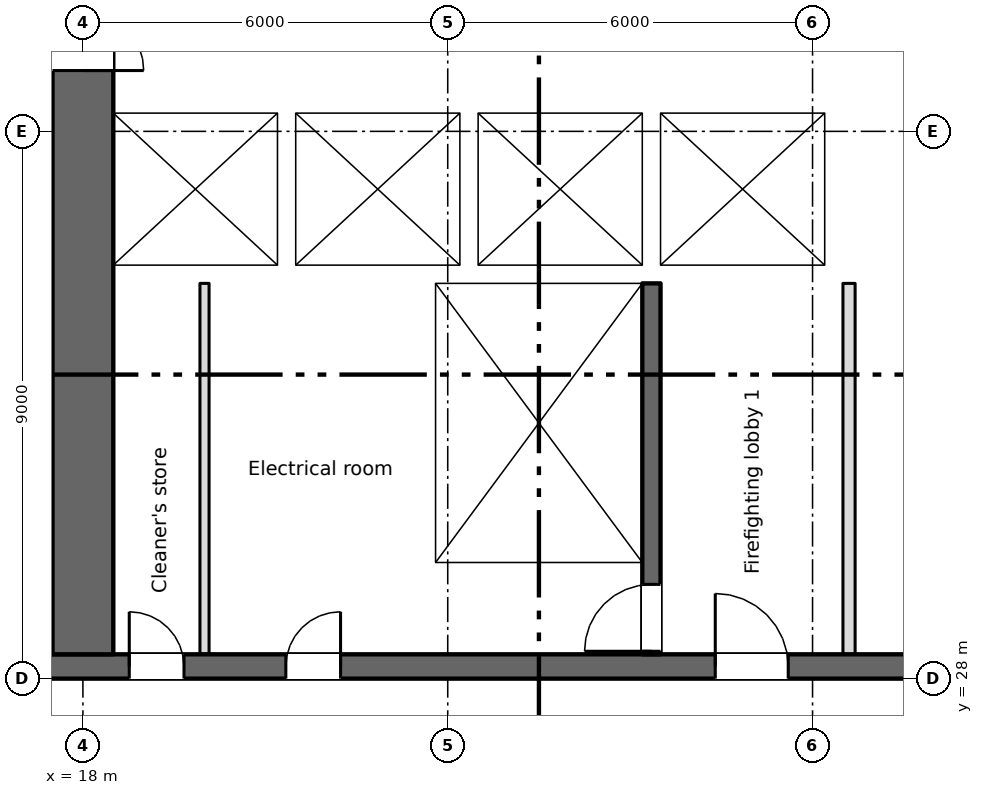
"""IFC4 building model, lengths in metres.
Left out: names, types, materials, properties, quantities, classifications, styles, units other than length and angle.
Written with IfcOpenShell. Run it as: python <this file> out.ifc"""

import sys

from ifc_helpers import new_model, si_unit, direction, frame, frame_2d, origin, place, context, subcontext, project, spatial, rectangle, extrude, element, fill, save


model = new_model("IFC4")
c1 = context("Model", 3, precision=1e-05, world=origin(), true_north=direction((0.0, 1.0)))
c2 = subcontext(c1, "Body", "Model", "MODEL_VIEW")
j1 = project(units=[si_unit("LENGTHUNIT", "METRE"), si_unit("PLANEANGLEUNIT", "RADIAN")], contexts=[c1])
p1 = place(None, origin())
s1 = spatial("IfcSite", under=j1, at=p1, CompositionType="ELEMENT")
p2 = place(p1, origin())
s2 = spatial("IfcBuilding", under=s1, at=p2, CompositionType="ELEMENT")
p3 = place(p2, frame((0.0, 0.0, 75.0)))
s3 = spatial("IfcBuildingStorey", under=s2, at=p3, CompositionType="ELEMENT", Elevation=75.0)
p4 = place(p3, frame((6.7, 28.2, 0.0), z_axis=(0.0, 0.0, 1.0), x_axis=(1.0, 0.0, 0.0)))
e1 = element("IfcWall", 1, at=p4, inside=s3, PredefinedType="SHEAR", context=c2, shape_type="SweptSolid", body=[
    extrude(rectangle(XDim=57.8, YDim=0.4, at=frame_2d((28.9, 0.0))), origin(), (0.0, 0.0, 1.0), 3.35),
])
p5 = place(p4, frame((12.062, 0.0, 0.0)))
e2 = element("IfcOpeningElement", 2, at=p5, cuts=e1, PredefinedType="OPENING", context=c2, shape_type="SweptSolid", body=[
    extrude(rectangle(XDim=0.9, YDim=2.1, at=frame_2d((0.45, 1.05))), frame((0.0, 0.21, 0.0), z_axis=(0.0, -1.0, 0.0), x_axis=(1.0, 0.0, 0.0)), (0.0, 0.0, 1.0), 0.42),
])
p6 = place(p4, frame((14.637, 0.0, 0.0)))
e3 = element("IfcOpeningElement", 3, at=p6, cuts=e1, PredefinedType="OPENING", context=c2, shape_type="SweptSolid", body=[
    extrude(rectangle(XDim=0.9, YDim=2.1, at=frame_2d((0.45, 1.05))), frame((0.0, 0.21, 0.0), z_axis=(0.0, -1.0, 0.0), x_axis=(1.0, 0.0, 0.0)), (0.0, 0.0, 1.0), 0.42),
])
p7 = place(p4, frame((49.062, 0.0, 0.0)))
e4 = element("IfcOpeningElement", 4, at=p7, cuts=e1, PredefinedType="OPENING", context=c2, shape_type="SweptSolid", body=[
    extrude(rectangle(XDim=0.9, YDim=2.1, at=frame_2d((0.45, 1.05))), frame((0.0, 0.21, 0.0), z_axis=(0.0, -1.0, 0.0), x_axis=(1.0, 0.0, 0.0)), (0.0, 0.0, 1.0), 0.42),
])
p8 = place(p4, frame((51.637, 0.0, 0.0)))
e5 = element("IfcOpeningElement", 5, at=p8, cuts=e1, PredefinedType="OPENING", context=c2, shape_type="SweptSolid", body=[
    extrude(rectangle(XDim=0.9, YDim=2.1, at=frame_2d((0.45, 1.05))), frame((0.0, 0.21, 0.0), z_axis=(0.0, -1.0, 0.0), x_axis=(1.0, 0.0, 0.0)), (0.0, 0.0, 1.0), 0.42),
])
p9 = place(p4, frame((1.35, 0.0, 0.0)))
e6 = element("IfcOpeningElement", 6, at=p9, cuts=e1, PredefinedType="OPENING", context=c2, shape_type="SweptSolid", body=[
    extrude(rectangle(XDim=0.9, YDim=2.1, at=frame_2d((0.45, 1.05))), frame((0.0, 0.21, 0.0), z_axis=(0.0, -1.0, 0.0), x_axis=(1.0, 0.0, 0.0)), (0.0, 0.0, 1.0), 0.42),
])
p10 = place(p4, frame((4.7, 0.0, 0.0)))
e7 = element("IfcOpeningElement", 7, at=p10, cuts=e1, PredefinedType="OPENING", context=c2, shape_type="SweptSolid", body=[
    extrude(rectangle(XDim=1.2, YDim=2.1, at=frame_2d((0.6, 1.05))), frame((0.0, 0.21, 0.0), z_axis=(0.0, -1.0, 0.0), x_axis=(1.0, 0.0, 0.0)), (0.0, 0.0, 1.0), 0.42),
])
p11 = place(p4, frame((31.7, 0.0, 0.0)))
e8 = element("IfcOpeningElement", 8, at=p11, cuts=e1, PredefinedType="OPENING", context=c2, shape_type="SweptSolid", body=[
    extrude(rectangle(XDim=1.2, YDim=2.1, at=frame_2d((0.6, 1.05))), frame((0.0, 0.21, 0.0), z_axis=(0.0, -1.0, 0.0), x_axis=(1.0, 0.0, 0.0)), (0.0, 0.0, 1.0), 0.42),
])
p12 = place(p4, frame((55.2, 0.0, 0.0)))
e9 = element("IfcOpeningElement", 9, at=p12, cuts=e1, PredefinedType="OPENING", context=c2, shape_type="SweptSolid", body=[
    extrude(rectangle(XDim=1.2, YDim=2.1, at=frame_2d((0.6, 1.05))), frame((0.0, 0.21, 0.0), z_axis=(0.0, -1.0, 0.0), x_axis=(1.0, 0.0, 0.0)), (0.0, 0.0, 1.0), 0.42),
])
p13 = place(p4, frame((21.7, 0.0, 0.0)))
e10 = element("IfcOpeningElement", 10, at=p13, cuts=e1, PredefinedType="OPENING", context=c2, shape_type="SweptSolid", body=[
    extrude(rectangle(XDim=1.2, YDim=2.1, at=frame_2d((0.6, 1.05))), frame((0.0, 0.21, 0.0), z_axis=(0.0, -1.0, 0.0), x_axis=(1.0, 0.0, 0.0)), (0.0, 0.0, 1.0), 0.42),
])
p14 = place(p4, frame((41.7, 0.0, 0.0)))
e11 = element("IfcOpeningElement", 11, at=p14, cuts=e1, PredefinedType="OPENING", context=c2, shape_type="SweptSolid", body=[
    extrude(rectangle(XDim=1.2, YDim=2.1, at=frame_2d((0.6, 1.05))), frame((0.0, 0.21, 0.0), z_axis=(0.0, -1.0, 0.0), x_axis=(1.0, 0.0, 0.0)), (0.0, 0.0, 1.0), 0.42),
])
p15 = place(p4, frame((24.85, 0.0, 0.0)))
e12 = element("IfcOpeningElement", 12, at=p15, cuts=e1, PredefinedType="OPENING", context=c2, shape_type="SweptSolid", body=[
    extrude(rectangle(XDim=2.4, YDim=2.1, at=frame_2d((1.2, 1.05))), frame((0.0, 0.21, 0.0), z_axis=(0.0, -1.0, 0.0), x_axis=(1.0, 0.0, 0.0)), (0.0, 0.0, 1.0), 0.42),
])
p16 = place(p4, frame((37.35, 0.0, 0.0)))
e13 = element("IfcOpeningElement", 13, at=p16, cuts=e1, PredefinedType="OPENING", context=c2, shape_type="SweptSolid", body=[
    extrude(rectangle(XDim=2.4, YDim=2.1, at=frame_2d((1.2, 1.05))), frame((0.0, 0.21, 0.0), z_axis=(0.0, -1.0, 0.0), x_axis=(1.0, 0.0, 0.0)), (0.0, 0.0, 1.0), 0.42),
])
p17 = place(p4, frame((7.85, 0.0, 0.0)))
e14 = element("IfcOpeningElement", 14, at=p17, cuts=e1, PredefinedType="OPENING", context=c2, shape_type="SweptSolid", body=[
    extrude(rectangle(XDim=2.4, YDim=2.1, at=frame_2d((1.2, 1.05))), frame((0.0, 0.21, 0.0), z_axis=(0.0, -1.0, 0.0), x_axis=(1.0, 0.0, 0.0)), (0.0, 0.0, 1.0), 0.42),
])
p18 = place(p4, frame((28.85, 0.0, 0.0)))
e15 = element("IfcOpeningElement", 15, at=p18, cuts=e1, PredefinedType="OPENING", context=c2, shape_type="SweptSolid", body=[
    extrude(rectangle(XDim=0.9, YDim=2.1, at=frame_2d((0.45, 1.05))), frame((0.0, 0.21, 0.0), z_axis=(0.0, -1.0, 0.0), x_axis=(1.0, 0.0, 0.0)), (0.0, 0.0, 1.0), 0.42),
])
p19 = place(p4, frame((34.85, 0.0, 0.0)))
e16 = element("IfcOpeningElement", 16, at=p19, cuts=e1, PredefinedType="OPENING", context=c2, shape_type="SweptSolid", body=[
    extrude(rectangle(XDim=0.9, YDim=2.1, at=frame_2d((0.45, 1.05))), frame((0.0, 0.21, 0.0), z_axis=(0.0, -1.0, 0.0), x_axis=(1.0, 0.0, 0.0)), (0.0, 0.0, 1.0), 0.42),
])
p20 = place(p3, frame((18.0, 28.4, 0.0), z_axis=(0.0, 0.0, 1.0), x_axis=(0.0, 1.0, 0.0)))
e17 = element("IfcWall", 17, at=p20, inside=s3, PredefinedType="SHEAR", context=c2, shape_type="SweptSolid", body=[
    extrude(rectangle(XDim=16.6, YDim=1.0, at=frame_2d((8.3, 0.0))), origin(), (0.0, 0.0, 1.0), 3.35),
])
p21 = place(p20, frame((9.6, 0.0, 0.0)))
e18 = element("IfcOpeningElement", 18, at=p21, cuts=e17, PredefinedType="OPENING", context=c2, shape_type="SweptSolid", body=[
    extrude(rectangle(XDim=2.0, YDim=2.1, at=frame_2d((1.0, 1.05))), frame((0.0, 0.51, 0.0), z_axis=(0.0, -1.0, 0.0), x_axis=(1.0, 0.0, 0.0)), (0.0, 0.0, 1.0), 1.02),
])
p22 = place(p20, frame((15.25, 0.0, 0.0)))
e19 = element("IfcOpeningElement", 19, at=p22, cuts=e17, PredefinedType="OPENING", context=c2, shape_type="SweptSolid", body=[
    extrude(rectangle(XDim=1.2, YDim=2.1, at=frame_2d((0.6, 1.05))), frame((0.0, 0.51, 0.0), z_axis=(0.0, -1.0, 0.0), x_axis=(1.0, 0.0, 0.0)), (0.0, 0.0, 1.0), 1.02),
])
p23 = place(p3, frame((23.65, 28.4, 0.0), z_axis=(0.0, 0.0, 1.0), x_axis=(0.0, 1.0, 0.0)))
e20 = element("IfcWall", 20, at=p23, inside=s3, PredefinedType="SHEAR", context=c2, shape_type="SweptSolid", body=[
    extrude(rectangle(XDim=6.1, YDim=0.3, at=frame_2d((3.05, 0.0))), origin(), (0.0, 0.0, 1.0), 3.35),
])
p24 = place(p3, frame((27.35, 28.4, 0.0), z_axis=(0.0, 0.0, 1.0), x_axis=(0.0, 1.0, 0.0)))
e21 = element("IfcWall", 21, at=p24, inside=s3, PredefinedType="SHEAR", context=c2, shape_type="SweptSolid", body=[
    extrude(rectangle(XDim=6.1, YDim=0.3, at=frame_2d((3.05, 0.0))), origin(), (0.0, 0.0, 1.0), 3.35),
])
p25 = place(p24, frame((0.05, 0.0, 0.0)))
e22 = element("IfcOpeningElement", 22, at=p25, cuts=e21, PredefinedType="OPENING", context=c2, shape_type="SweptSolid", body=[
    extrude(rectangle(XDim=1.1, YDim=2.1, at=frame_2d((0.55, 1.05))), frame((0.0, 0.16, 0.0), z_axis=(0.0, -1.0, 0.0), x_axis=(1.0, 0.0, 0.0)), (0.0, 0.0, 1.0), 0.32),
])
p26 = place(p3, frame((18.5, 34.65, 0.0), z_axis=(0.0, 0.0, 1.0), x_axis=(1.0, 0.0, 0.0)))
e23 = element("IfcWall", 23, at=p26, inside=s3, PredefinedType="SHEAR", context=c2, shape_type="SweptSolid", body=[
    extrude(rectangle(XDim=12.2, YDim=0.3, at=frame_2d((6.1, 0.0))), origin(), (0.0, 0.0, 1.0), 3.35),
])
p27 = place(p26, frame((9.8, 0.0, 0.0)))
e24 = element("IfcOpeningElement", 24, at=p27, cuts=e23, PredefinedType="OPENING", context=c2, shape_type="SweptSolid", body=[
    extrude(rectangle(XDim=1.1, YDim=2.1, at=frame_2d((0.55, 1.05))), frame((0.0, 0.16, 0.0), z_axis=(0.0, -1.0, 0.0), x_axis=(1.0, 0.0, 0.0)), (0.0, 0.0, 1.0), 0.32),
])
p28 = place(p3, frame((18.5, 37.45, 0.0), z_axis=(0.0, 0.0, 1.0), x_axis=(1.0, 0.0, 0.0)))
e25 = element("IfcWall", 25, at=p28, inside=s3, PredefinedType="SHEAR", context=c2, shape_type="SweptSolid", body=[
    extrude(rectangle(XDim=12.2, YDim=0.3, at=frame_2d((6.1, 0.0))), origin(), (0.0, 0.0, 1.0), 3.35),
])
p29 = place(p28, frame((0.8, 0.0, 0.0)))
e26 = element("IfcOpeningElement", 26, at=p29, cuts=e25, PredefinedType="OPENING", context=c2, shape_type="SweptSolid", body=[
    extrude(rectangle(XDim=1.1, YDim=2.1, at=frame_2d((0.55, 1.05))), frame((0.0, 0.16, 0.0), z_axis=(0.0, -1.0, 0.0), x_axis=(1.0, 0.0, 0.0)), (0.0, 0.0, 1.0), 0.32),
])
p30 = place(p28, frame((3.8, 0.0, 0.0)))
e27 = element("IfcOpeningElement", 27, at=p30, cuts=e25, PredefinedType="OPENING", context=c2, shape_type="SweptSolid", body=[
    extrude(rectangle(XDim=1.1, YDim=2.1, at=frame_2d((0.55, 1.05))), frame((0.0, 0.16, 0.0), z_axis=(0.0, -1.0, 0.0), x_axis=(1.0, 0.0, 0.0)), (0.0, 0.0, 1.0), 0.32),
])
p31 = place(p28, frame((6.8, 0.0, 0.0)))
e28 = element("IfcOpeningElement", 28, at=p31, cuts=e25, PredefinedType="OPENING", context=c2, shape_type="SweptSolid", body=[
    extrude(rectangle(XDim=1.1, YDim=2.1, at=frame_2d((0.55, 1.05))), frame((0.0, 0.16, 0.0), z_axis=(0.0, -1.0, 0.0), x_axis=(1.0, 0.0, 0.0)), (0.0, 0.0, 1.0), 0.32),
])
p32 = place(p3, frame((27.35, 34.8, 0.0), z_axis=(0.0, 0.0, 1.0), x_axis=(0.0, 1.0, 0.0)))
e29 = element("IfcWall", 29, at=p32, inside=s3, PredefinedType="SHEAR", context=c2, shape_type="SweptSolid", body=[
    extrude(rectangle(XDim=2.5, YDim=0.3, at=frame_2d((1.25, 0.0))), origin(), (0.0, 0.0, 1.0), 3.35),
])
p33 = place(p3, frame((30.45, 34.8, 0.0), z_axis=(0.0, 0.0, 1.0), x_axis=(0.0, 1.0, 0.0)))
e30 = element("IfcWall", 30, at=p33, inside=s3, PredefinedType="SHEAR", context=c2, shape_type="SweptSolid", body=[
    extrude(rectangle(XDim=2.5, YDim=0.5, at=frame_2d((1.25, 0.0))), origin(), (0.0, 0.0, 1.0), 3.35),
])
for number, where, z_axis, x_axis in (
    (31, (21.35, 34.8, 0.0), (0.0, 0.0, 1.0), (0.0, 1.0, 0.0)),
    (32, (24.35, 34.8, 0.0), (0.0, 0.0, 1.0), (0.0, 1.0, 0.0)),
):
    element("IfcWall", number, at=place(p3, frame(where, z_axis=z_axis, x_axis=x_axis)), inside=s3, PredefinedType="SHEAR", context=c2, shape_type="SweptSolid", body=[
        extrude(rectangle(XDim=2.5, YDim=0.3, at=frame_2d((1.25, 0.0))), origin(), (0.0, 0.0, 1.0), 3.35),
    ])
p34 = place(p3, frame((30.6, 28.4, 0.0), z_axis=(0.0, 0.0, 1.0), x_axis=(0.0, 1.0, 0.0)))
e33 = element("IfcWall", 33, at=p34, inside=s3, PredefinedType="PARTITIONING", context=c2, shape_type="SweptSolid", body=[
    extrude(rectangle(XDim=6.1, YDim=0.2, at=frame_2d((3.05, 0.0))), origin(), (0.0, 0.0, 1.0), 3.35),
])
p35 = place(p3, frame((20.0, 28.4, 0.0), z_axis=(0.0, 0.0, 1.0), x_axis=(0.0, 1.0, 0.0)))
e34 = element("IfcWall", 34, at=p35, inside=s3, PredefinedType="PARTITIONING", context=c2, shape_type="SweptSolid", body=[
    extrude(rectangle(XDim=6.1, YDim=0.15, at=frame_2d((3.05, 0.0))), origin(), (0.0, 0.0, 1.0), 3.35),
])
p36 = place(p5, origin())
e35 = element("IfcDoor", 35, at=p36, inside=s3, OperationType="SINGLE_SWING_LEFT", PredefinedType="DOOR", context=c2, shape_type="SweptSolid", body=[
    extrude(rectangle(XDim=0.9, YDim=2.1, at=frame_2d((0.45, 1.05))), frame((0.0, 0.025, 0.0), z_axis=(0.0, -1.0, 0.0), x_axis=(1.0, 0.0, 0.0)), (0.0, 0.0, 1.0), 0.05),
])
fill(e2, e35)
p37 = place(p6, origin())
e36 = element("IfcDoor", 36, at=p37, inside=s3, OperationType="SINGLE_SWING_RIGHT", PredefinedType="DOOR", context=c2, shape_type="SweptSolid", body=[
    extrude(rectangle(XDim=0.9, YDim=2.1, at=frame_2d((0.45, 1.05))), frame((0.0, 0.025, 0.0), z_axis=(0.0, -1.0, 0.0), x_axis=(1.0, 0.0, 0.0)), (0.0, 0.0, 1.0), 0.05),
])
fill(e3, e36)
p38 = place(p29, origin())
e37 = element("IfcDoor", 37, at=p38, inside=s3, OperationType="SLIDING_TO_LEFT", PredefinedType="DOOR", context=c2, shape_type="SweptSolid", body=[
    extrude(rectangle(XDim=1.1, YDim=2.1, at=frame_2d((0.55, 1.05))), frame((0.0, 0.025, 0.0), z_axis=(0.0, -1.0, 0.0), x_axis=(1.0, 0.0, 0.0)), (0.0, 0.0, 1.0), 0.05),
])
fill(e26, e37)
p39 = place(p30, origin())
e38 = element("IfcDoor", 38, at=p39, inside=s3, OperationType="SLIDING_TO_LEFT", PredefinedType="DOOR", context=c2, shape_type="SweptSolid", body=[
    extrude(rectangle(XDim=1.1, YDim=2.1, at=frame_2d((0.55, 1.05))), frame((0.0, 0.025, 0.0), z_axis=(0.0, -1.0, 0.0), x_axis=(1.0, 0.0, 0.0)), (0.0, 0.0, 1.0), 0.05),
])
fill(e27, e38)
p40 = place(p31, origin())
e39 = element("IfcDoor", 39, at=p40, inside=s3, OperationType="SLIDING_TO_LEFT", PredefinedType="DOOR", context=c2, shape_type="SweptSolid", body=[
    extrude(rectangle(XDim=1.1, YDim=2.1, at=frame_2d((0.55, 1.05))), frame((0.0, 0.025, 0.0), z_axis=(0.0, -1.0, 0.0), x_axis=(1.0, 0.0, 0.0)), (0.0, 0.0, 1.0), 0.05),
])
fill(e28, e39)
p41 = place(p27, origin())
e40 = element("IfcDoor", 40, at=p41, inside=s3, OperationType="SLIDING_TO_LEFT", PredefinedType="DOOR", context=c2, shape_type="SweptSolid", body=[
    extrude(rectangle(XDim=1.1, YDim=2.1, at=frame_2d((0.55, 1.05))), frame((0.0, 0.025, 0.0), z_axis=(0.0, -1.0, 0.0), x_axis=(1.0, 0.0, 0.0)), (0.0, 0.0, 1.0), 0.05),
])
fill(e24, e40)
p42 = place(p25, origin())
e41 = element("IfcDoor", 41, at=p42, inside=s3, OperationType="SINGLE_SWING_LEFT", PredefinedType="DOOR", context=c2, shape_type="SweptSolid", body=[
    extrude(rectangle(XDim=1.1, YDim=2.1, at=frame_2d((0.55, 1.05))), frame((0.0, 0.025, 0.0), z_axis=(0.0, -1.0, 0.0), x_axis=(1.0, 0.0, 0.0)), (0.0, 0.0, 1.0), 0.05),
])
fill(e22, e41)
p43 = place(p13, origin())
e42 = element("IfcDoor", 42, at=p43, inside=s3, OperationType="SINGLE_SWING_LEFT", PredefinedType="DOOR", context=c2, shape_type="SweptSolid", body=[
    extrude(rectangle(XDim=1.2, YDim=2.1, at=frame_2d((0.6, 1.05))), frame((0.0, 0.025, 0.0), z_axis=(0.0, -1.0, 0.0), x_axis=(1.0, 0.0, 0.0)), (0.0, 0.0, 1.0), 0.05),
])
fill(e10, e42)
p44 = place(p21, origin())
e43 = element("IfcDoor", 43, at=p44, inside=s3, OperationType="DOUBLE_DOOR_SINGLE_SWING", PredefinedType="DOOR", context=c2, shape_type="SweptSolid", body=[
    extrude(rectangle(XDim=2.0, YDim=2.1, at=frame_2d((1.0, 1.05))), frame((0.0, 0.025, 0.0), z_axis=(0.0, -1.0, 0.0), x_axis=(1.0, 0.0, 0.0)), (0.0, 0.0, 1.0), 0.05),
])
fill(e18, e43)
save(model, sys.argv[1])
